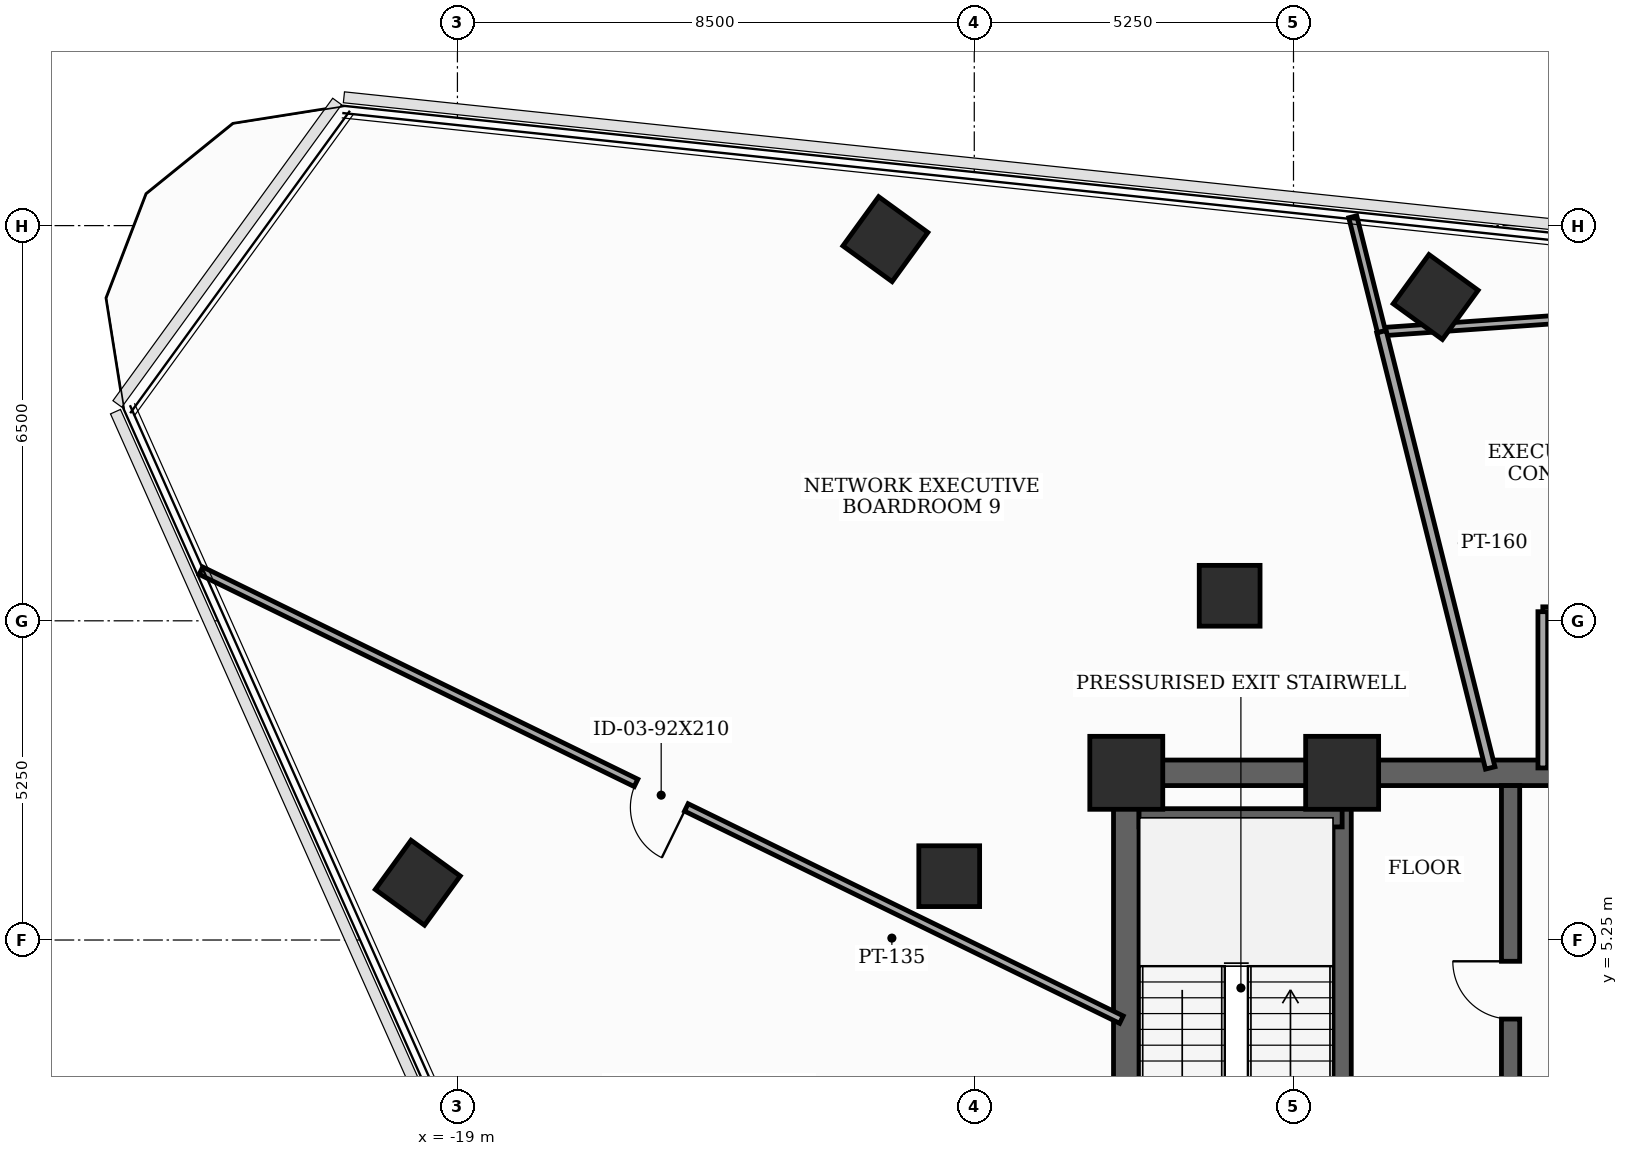
"""IFC4 building model, lengths in metres.
Left out: names, types, materials, properties, quantities, classifications, styles, units other than length and angle.
Written with IfcOpenShell. Run it as: python <this file> out.ifc"""

import sys

from ifc_helpers import new_model, si_unit, direction, frame, frame_2d, origin, origin_2d, place, context, subcontext, project, spatial, rectangle, extrude, element, fill, save


model = new_model("IFC4")
c1 = context("Model", 3, precision=1e-05, world=origin(), true_north=direction((0.0, 1.0)))
c2 = subcontext(c1, "Body", "Model", "MODEL_VIEW")
j1 = project(units=[si_unit("LENGTHUNIT", "METRE"), si_unit("PLANEANGLEUNIT", "RADIAN")], contexts=[c1])
p1 = place(None, origin())
s1 = spatial("IfcSite", under=j1, at=p1, CompositionType="ELEMENT")
p2 = place(p1, origin())
s2 = spatial("IfcBuilding", under=s1, at=p2, CompositionType="ELEMENT")
p3 = place(p2, frame((0.0, 0.0, 222.6)))
s3 = spatial("IfcBuildingStorey", under=s2, at=p3, CompositionType="ELEMENT", Elevation=222.6)
for number, where, z_axis, x_axis in (
    (1, (-4.45, 8.0, 0.0), (0.0, 0.0, 1.0), (1.0, 0.0, 0.0)),
    (2, (-8.0, 8.0, 0.0), (0.0, 0.0, 1.0), (1.0, 0.0, 0.0)),
):
    element("IfcColumn", number, at=place(p3, frame(where, z_axis=z_axis, x_axis=x_axis)), inside=s3, PredefinedType="COLUMN", context=c2, shape_type="SweptSolid", body=[
        extrude(rectangle(XDim=1.2, YDim=1.2, at=origin_2d()), origin(), (0.0, 0.0, 1.0), 3.7),
    ])
for number, where, z_axis, x_axis in (
    (3, (-6.3, 10.912, 0.0), (0.0, 0.0, 1.0), (1.0, 0.0, 0.0)),
    (4, (-10.912, 6.3, 0.0), (0.0, 0.0, 1.0), (1.0, 0.0, 0.0)),
    (5, (-2.912, 15.826, 0.0), (0.0, 0.0, 1.0), (0.588, 0.809, 0.0)),
    (6, (-11.962, 16.777, 0.0), (0.0, 0.0, 1.0), (0.588, 0.809, 0.0)),
    (7, (-19.652, 6.192, 0.0), (0.0, 0.0, 1.0), (0.588, 0.809, 0.0)),
):
    element("IfcColumn", number, at=place(p3, frame(where, z_axis=z_axis, x_axis=x_axis)), inside=s3, PredefinedType="COLUMN", context=c2, shape_type="SweptSolid", body=[
        extrude(rectangle(XDim=1.0, YDim=1.0, at=origin_2d()), origin(), (0.0, 0.0, 1.0), 3.7),
    ])
p4 = place(p3, frame((-8.0, -8.0, 0.0), z_axis=(0.0, 0.0, 1.0), x_axis=(0.0, 1.0, 0.0)))
e8 = element("IfcWall", 8, at=p4, inside=s3, PredefinedType="SHEAR", context=c2, shape_type="SweptSolid", body=[
    extrude(rectangle(XDim=16.0, YDim=0.42, at=frame_2d((8.0, 0.0))), origin(), (0.0, 0.0, 1.0), 3.5),
])
p5 = place(p4, frame((0.761, 0.0, 0.0)))
e9 = element("IfcOpeningElement", 9, at=p5, cuts=e8, PredefinedType="OPENING", context=c2, shape_type="SweptSolid", body=[
    extrude(rectangle(XDim=0.85, YDim=2.02, at=frame_2d((0.425, 1.01))), frame((0.0, 0.22, 0.0), z_axis=(0.0, -1.0, 0.0), x_axis=(1.0, 0.0, 0.0)), (0.0, 0.0, 1.0), 0.44),
])
p6 = place(p4, frame((5.35, 0.0, 0.0)))
e10 = element("IfcOpeningElement", 10, at=p6, cuts=e8, PredefinedType="OPENING", context=c2, shape_type="SweptSolid", body=[
    extrude(rectangle(XDim=1.05, YDim=2.15, at=frame_2d((0.525, 1.075))), frame((0.0, 0.22, 0.0), z_axis=(0.0, -1.0, 0.0), x_axis=(1.0, 0.0, 0.0)), (0.0, 0.0, 1.0), 0.44),
])
p7 = place(p3, frame((-8.0, 8.0, 0.0), z_axis=(0.0, 0.0, 1.0), x_axis=(1.0, 0.0, 0.0)))
e11 = element("IfcWall", 11, at=p7, inside=s3, PredefinedType="SHEAR", context=c2, shape_type="SweptSolid", body=[
    extrude(rectangle(XDim=16.0, YDim=0.42, at=frame_2d((8.0, 0.0))), origin(), (0.0, 0.0, 1.0), 3.5),
])
p8 = place(p7, frame((7.1, 0.0, 0.0)))
e12 = element("IfcOpeningElement", 12, at=p8, cuts=e11, PredefinedType="OPENING", context=c2, shape_type="SweptSolid", body=[
    extrude(rectangle(XDim=1.8, YDim=2.15, at=frame_2d((0.9, 1.075))), frame((0.0, 0.22, 0.0), z_axis=(0.0, -1.0, 0.0), x_axis=(1.0, 0.0, 0.0)), (0.0, 0.0, 1.0), 0.44),
])
p9 = place(p3, frame((-4.45, -7.79, 0.0), z_axis=(0.0, 0.0, 1.0), x_axis=(0.0, 1.0, 0.0)))
e13 = element("IfcWall", 13, at=p9, inside=s3, PredefinedType="SHEAR", context=c2, shape_type="SweptSolid", body=[
    extrude(rectangle(XDim=15.58, YDim=0.3, at=frame_2d((7.79, 0.0))), origin(), (0.0, 0.0, 1.0), 3.5),
])
p10 = place(p3, frame((-7.79, 7.26, 0.0), z_axis=(0.0, 0.0, 1.0), x_axis=(1.0, 0.0, 0.0)))
e14 = element("IfcWall", 14, at=p10, inside=s3, PredefinedType="SHEAR", context=c2, shape_type="SweptSolid", body=[
    extrude(rectangle(XDim=3.34, YDim=0.3, at=frame_2d((1.67, 0.0))), origin(), (0.0, 0.0, 1.0), 3.5),
])
p11 = place(p3, frame((-1.68, -4.85, 0.0), z_axis=(0.0, 0.0, 1.0), x_axis=(0.0, 1.0, 0.0)))
e15 = element("IfcWall", 15, at=p11, inside=s3, PredefinedType="SHEAR", context=c2, shape_type="SweptSolid", body=[
    extrude(rectangle(XDim=12.64, YDim=0.3, at=frame_2d((6.32, 0.0))), origin(), (0.0, 0.0, 1.0), 3.5),
])
p12 = place(p11, frame((2.6, 0.0, 0.0)))
e16 = element("IfcOpeningElement", 16, at=p12, cuts=e15, PredefinedType="OPENING", context=c2, shape_type="SweptSolid", body=[
    extrude(rectangle(XDim=0.95, YDim=2.1, at=frame_2d((0.475, 1.05))), frame((0.0, 0.16, 0.0), z_axis=(0.0, -1.0, 0.0), x_axis=(1.0, 0.0, 0.0)), (0.0, 0.0, 1.0), 0.32),
])
p13 = place(p11, frame((8.8, 0.0, 0.0)))
e17 = element("IfcOpeningElement", 17, at=p13, cuts=e15, PredefinedType="OPENING", context=c2, shape_type="SweptSolid", body=[
    extrude(rectangle(XDim=0.95, YDim=2.1, at=frame_2d((0.475, 1.05))), frame((0.0, 0.16, 0.0), z_axis=(0.0, -1.0, 0.0), x_axis=(1.0, 0.0, 0.0)), (0.0, 0.0, 1.0), 0.32),
])
p14 = place(p3, frame((10.15, 10.65, 0.0), z_axis=(0.0, 0.0, 1.0), x_axis=(-1.0, 0.0, 0.0)))
e18 = element("IfcWall", 18, at=p14, inside=s3, PredefinedType="PARTITIONING", context=c2, shape_type="SweptSolid", body=[
    extrude(rectangle(XDim=11.3, YDim=0.16, at=frame_2d((5.65, 0.0))), origin(), (0.0, 0.0, 1.0), 2.885),
])
p15 = place(p14, frame((6.506, 0.0, 0.0)))
e19 = element("IfcOpeningElement", 19, at=p15, cuts=e18, PredefinedType="OPENING", context=c2, shape_type="SweptSolid", body=[
    extrude(rectangle(XDim=1.0, YDim=2.15, at=frame_2d((0.5, 1.075))), frame((0.0, 0.09, 0.0), z_axis=(0.0, -1.0, 0.0), x_axis=(1.0, 0.0, 0.0)), (0.0, 0.0, 1.0), 0.18),
])
p16 = place(p3, frame((-1.15, 10.65, 0.0), z_axis=(0.0, 0.0, 1.0), x_axis=(0.0, -1.0, 0.0)))
e20 = element("IfcWall", 20, at=p16, inside=s3, PredefinedType="PARTITIONING", context=c2, shape_type="SweptSolid", body=[
    extrude(rectangle(XDim=2.57, YDim=0.16, at=frame_2d((1.285, 0.0))), origin(), (0.0, 0.0, 1.0), 2.885),
])
p17 = place(p3, frame((-8.08, 3.941, 0.0), z_axis=(0.0, 0.0, 1.0), x_axis=(-0.898787530524, 0.438384505856, 0.0)))
e21 = element("IfcWall", 21, at=p17, inside=s3, PredefinedType="PARTITIONING", context=c2, shape_type="SweptSolid", body=[
    extrude(rectangle(XDim=16.843, YDim=0.135, at=frame_2d((8.421, 0.0))), origin(), (0.0, 0.0, 1.0), 2.885),
])
p18 = place(p17, frame((7.961, 0.0, 0.0)))
e22 = element("IfcOpeningElement", 22, at=p18, cuts=e21, PredefinedType="OPENING", context=c2, shape_type="SweptSolid", body=[
    extrude(rectangle(XDim=0.92, YDim=2.1, at=frame_2d((0.46, 1.05))), frame((0.0, 0.077, 0.0), z_axis=(0.0, -1.0, 0.0), x_axis=(1.0, 0.0, 0.0)), (0.0, 0.0, 1.0), 0.155),
])
p19 = place(p3, frame((-3.803, 15.255, 0.0), z_axis=(0.0, 0.0, 1.0), x_axis=(0.997563622011, 0.069762597718, 0.0)))
e23 = element("IfcWall", 23, at=p19, inside=s3, PredefinedType="PARTITIONING", context=c2, shape_type="SweptSolid", body=[
    extrude(rectangle(XDim=5.879, YDim=0.135, at=frame_2d((2.94, 0.0))), origin(), (0.0, 0.0, 1.0), 2.985),
])
p20 = place(p3, frame((-4.275, 17.146, 0.0), z_axis=(0.0, 0.0, 1.0), x_axis=(0.242417712213, -0.970171970738, 0.0)))
e24 = element("IfcWall", 24, at=p20, inside=s3, PredefinedType="PARTITIONING", context=c2, shape_type="SweptSolid", body=[
    extrude(rectangle(XDim=1.949, YDim=0.135, at=frame_2d((0.974, 0.0))), origin(), (0.0, 0.0, 1.0), 3.035),
])
p21 = place(p3, frame((-3.803, 15.255, 0.0), z_axis=(0.0, 0.0, 1.0), x_axis=(0.241851911951, -0.970313172479, 0.0)))
e25 = element("IfcWall", 25, at=p21, inside=s3, PredefinedType="PARTITIONING", context=c2, shape_type="SweptSolid", body=[
    extrude(rectangle(XDim=7.394, YDim=0.16, at=frame_2d((3.697, 0.0))), origin(), (0.0, 0.0, 1.0), 2.885),
])
p22 = place(p13, origin())
e26 = element("IfcDoor", 26, at=p22, inside=s3, OperationType="SINGLE_SWING_RIGHT", PredefinedType="DOOR", context=c2, shape_type="SweptSolid", body=[
    extrude(rectangle(XDim=0.95, YDim=2.1, at=frame_2d((0.475, 1.05))), frame((0.0, 0.025, 0.0), z_axis=(0.0, -1.0, 0.0), x_axis=(1.0, 0.0, 0.0)), (0.0, 0.0, 1.0), 0.05),
])
fill(e17, e26)
p23 = place(p18, origin())
e27 = element("IfcDoor", 27, at=p23, inside=s3, OperationType="SINGLE_SWING_LEFT", PredefinedType="DOOR", context=c2, shape_type="SweptSolid", body=[
    extrude(rectangle(XDim=0.92, YDim=2.1, at=frame_2d((0.46, 1.05))), frame((0.0, 0.025, 0.0), z_axis=(0.0, -1.0, 0.0), x_axis=(1.0, 0.0, 0.0)), (0.0, 0.0, 1.0), 0.05),
])
fill(e22, e27)
save(model, sys.argv[1])
